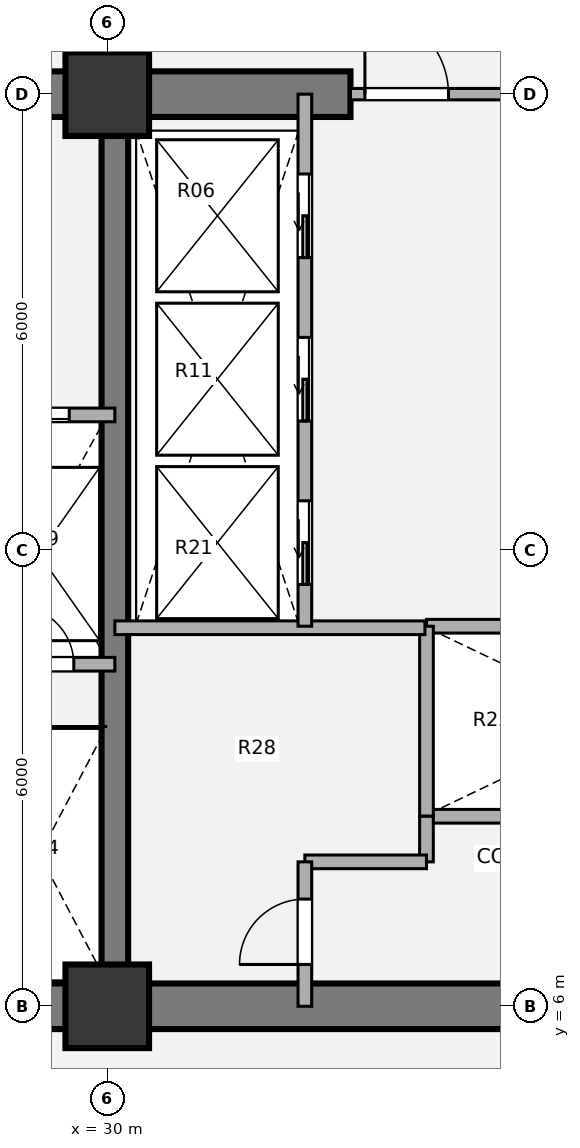
"""IFC4 building model, lengths in metres.
Left out: names, types, materials, properties, quantities, classifications, styles, units other than length and angle.
Written with IfcOpenShell. Run it as: python <this file> out.ifc"""

import sys

from ifc_helpers import new_model, si_unit, direction, frame, frame_2d, origin, origin_2d, place, context, subcontext, project, spatial, rectangle, extrude, source, transform, mapped, element, fill, save


model = new_model("IFC4")
c1 = context("Model", 3, precision=1e-05, world=origin(), true_north=direction((0.0, 1.0)))
c2 = subcontext(c1, "Body", "Model", "MODEL_VIEW")
j1 = project(units=[si_unit("LENGTHUNIT", "METRE"), si_unit("PLANEANGLEUNIT", "RADIAN")], contexts=[c1])
p1 = place(None, origin())
s1 = spatial("IfcSite", under=j1, at=p1, CompositionType="ELEMENT")
p2 = place(p1, origin())
s2 = spatial("IfcBuilding", under=s1, at=p2, CompositionType="ELEMENT")
p3 = place(p2, frame((0.0, 0.0, 49.68)))
s3 = spatial("IfcBuildingStorey", under=s2, at=p3, CompositionType="ELEMENT", Elevation=49.68)
m1 = source(origin(), c2, "Body", "SweptSolid", [
    extrude(rectangle(XDim=1.1, YDim=1.1, at=origin_2d()), origin(), (0.0, 0.0, 1.0), 3.78),
])
for number, where, z_axis, x_axis in (
    (1, (30.0, 6.0, 0.0), (0.0, 0.0, 1.0), (1.0, 0.0, 0.0)),
    (2, (30.0, 18.0, 0.0), (0.0, 0.0, 1.0), (1.0, 0.0, 0.0)),
):
    element("IfcColumn", number, at=place(p3, frame(where, z_axis=z_axis, x_axis=x_axis)), inside=s3, PredefinedType="COLUMN", context=c2, shape_type="MappedRepresentation", body=[
        mapped(m1, transform((0.0, 0.0, 0.0), x_axis=(1.0, 0.0, 0.0), y_axis=(0.0, 1.0, 0.0), z_axis=(0.0, 0.0, 1.0), scale=1.0)),
    ])
p4 = place(p3, frame((48.3, 6.0, 0.0), z_axis=(0.0, 0.0, 1.0), x_axis=(-1.0, 0.0, 0.0)))
e3 = element("IfcWall", 3, at=p4, inside=s3, PredefinedType="SHEAR", context=c2, shape_type="SweptSolid", body=[
    extrude(rectangle(XDim=24.6, YDim=0.6, at=frame_2d((12.3, 0.0))), origin(), (0.0, 0.0, 1.0), 3.78),
])
p5 = place(p3, frame((23.7, 18.0, 0.0), z_axis=(0.0, 0.0, 1.0), x_axis=(1.0, 0.0, 0.0)))
e4 = element("IfcWall", 4, at=p5, inside=s3, PredefinedType="SHEAR", context=c2, shape_type="SweptSolid", body=[
    extrude(rectangle(XDim=9.5, YDim=0.6, at=frame_2d((4.75, 0.0))), origin(), (0.0, 0.0, 1.0), 3.78),
])
p6 = place(p5, frame((2.95, 0.0, 0.0)))
e5 = element("IfcOpeningElement", 5, at=p6, cuts=e4, PredefinedType="OPENING", context=c2, shape_type="SweptSolid", body=[
    extrude(rectangle(XDim=1.1, YDim=2.1, at=origin_2d()), frame((0.55, 0.31, 1.05), z_axis=(0.0, -1.0, 0.0), x_axis=(1.0, 0.0, 0.0)), (0.0, 0.0, 1.0), 0.62),
])
p7 = place(p3, frame((30.1, 6.0, 0.0), z_axis=(0.0, 0.0, 1.0), x_axis=(0.0, 1.0, 0.0)))
e6 = element("IfcWall", 6, at=p7, inside=s3, PredefinedType="SHEAR", context=c2, shape_type="SweptSolid", body=[
    extrude(rectangle(XDim=12.0, YDim=0.35, at=frame_2d((6.0, 0.0))), origin(), (0.0, 0.0, 1.0), 3.78),
])
for number, where, z_axis, x_axis in (
    (7, (34.2, 11.0, 0.0), (0.0, 0.0, 1.0), (1.0, 0.0, 0.0)),
    (8, (34.2, 8.5, 0.0), (0.0, 0.0, 1.0), (1.0, 0.0, 0.0)),
):
    element("IfcWall", number, at=place(p3, frame(where, z_axis=z_axis, x_axis=x_axis)), inside=s3, PredefinedType="PARTITIONING", context=c2, shape_type="SweptSolid", body=[
        extrude(rectangle(XDim=5.15, YDim=0.18, at=frame_2d((2.575, 0.0))), origin(), (0.0, 0.0, 1.0), 3.5),
    ])
p8 = place(p3, frame((34.2, 8.5, 0.0), z_axis=(0.0, 0.0, 1.0), x_axis=(0.0, 1.0, 0.0)))
e9 = element("IfcWall", 9, at=p8, inside=s3, PredefinedType="PARTITIONING", context=c2, shape_type="SweptSolid", body=[
    extrude(rectangle(XDim=2.5, YDim=0.18, at=frame_2d((1.25, 0.0))), origin(), (0.0, 0.0, 1.0), 3.5),
])
p9 = place(p3, frame((30.1, 10.98, 0.0), z_axis=(0.0, 0.0, 1.0), x_axis=(1.0, 0.0, 0.0)))
e10 = element("IfcWall", 10, at=p9, inside=s3, PredefinedType="PARTITIONING", context=c2, shape_type="SweptSolid", body=[
    extrude(rectangle(XDim=4.08, YDim=0.18, at=frame_2d((2.04, 0.0))), origin(), (0.0, 0.0, 1.0), 3.5),
])
p10 = place(p3, frame((34.2, 7.9, 0.0), z_axis=(0.0, 0.0, 1.0), x_axis=(0.0, 1.0, 0.0)))
e11 = element("IfcWall", 11, at=p10, inside=s3, PredefinedType="PARTITIONING", context=c2, shape_type="SweptSolid", body=[
    extrude(rectangle(XDim=0.6, YDim=0.18, at=frame_2d((0.3, 0.0))), origin(), (0.0, 0.0, 1.0), 3.5),
])
p11 = place(p3, frame((32.6, 7.9, 0.0), z_axis=(0.0, 0.0, 1.0), x_axis=(1.0, 0.0, 0.0)))
e12 = element("IfcWall", 12, at=p11, inside=s3, PredefinedType="PARTITIONING", context=c2, shape_type="SweptSolid", body=[
    extrude(rectangle(XDim=1.6, YDim=0.18, at=frame_2d((0.8, 0.0))), origin(), (0.0, 0.0, 1.0), 3.5),
])
p12 = place(p3, frame((32.6, 6.0, 0.0), z_axis=(0.0, 0.0, 1.0), x_axis=(0.0, 1.0, 0.0)))
e13 = element("IfcWall", 13, at=p12, inside=s3, PredefinedType="PARTITIONING", context=c2, shape_type="SweptSolid", body=[
    extrude(rectangle(XDim=1.9, YDim=0.18, at=frame_2d((0.95, 0.0))), origin(), (0.0, 0.0, 1.0), 3.5),
])
p13 = place(p12, frame((0.55, 0.0, 0.0)))
e14 = element("IfcOpeningElement", 14, at=p13, cuts=e13, PredefinedType="OPENING", context=c2, shape_type="SweptSolid", body=[
    extrude(rectangle(XDim=0.86, YDim=2.1, at=origin_2d()), frame((0.43, 0.1, 1.05), z_axis=(0.0, -1.0, 0.0), x_axis=(1.0, 0.0, 0.0)), (0.0, 0.0, 1.0), 0.2),
])
p14 = place(p3, frame((33.2, 18.0, 0.0), z_axis=(0.0, 0.0, 1.0), x_axis=(1.0, 0.0, 0.0)))
e15 = element("IfcWall", 15, at=p14, inside=s3, PredefinedType="PARTITIONING", context=c2, shape_type="SweptSolid", body=[
    extrude(rectangle(XDim=5.6, YDim=0.15, at=frame_2d((2.8, 0.0))), origin(), (0.0, 0.0, 1.0), 2.315),
])
p15 = place(p14, frame((0.19, 0.0, 0.0)))
e16 = element("IfcOpeningElement", 16, at=p15, cuts=e15, PredefinedType="OPENING", context=c2, shape_type="SweptSolid", body=[
    extrude(rectangle(XDim=1.1, YDim=2.1, at=origin_2d()), frame((0.55, 0.085, 1.05), z_axis=(0.0, -1.0, 0.0), x_axis=(1.0, 0.0, 0.0)), (0.0, 0.0, 1.0), 0.17),
])
p16 = place(p14, frame((4.31, 0.0, 0.0)))
e17 = element("IfcOpeningElement", 17, at=p16, cuts=e15, PredefinedType="OPENING", context=c2, shape_type="SweptSolid", body=[
    extrude(rectangle(XDim=1.1, YDim=2.1, at=origin_2d()), frame((0.55, 0.085, 1.05), z_axis=(0.0, -1.0, 0.0), x_axis=(1.0, 0.0, 0.0)), (0.0, 0.0, 1.0), 0.17),
])
p17 = place(p3, frame((24.0, 13.78, 0.0), z_axis=(0.0, 0.0, 1.0), x_axis=(1.0, 0.0, 0.0)))
e18 = element("IfcWall", 18, at=p17, inside=s3, PredefinedType="PARTITIONING", context=c2, shape_type="SweptSolid", body=[
    extrude(rectangle(XDim=6.1, YDim=0.18, at=frame_2d((3.05, 0.0))), origin(), (0.0, 0.0, 1.0), 3.5),
])
p18 = place(p17, frame((1.15, 0.0, 0.0)))
e19 = element("IfcOpeningElement", 19, at=p18, cuts=e18, PredefinedType="OPENING", context=c2, shape_type="SweptSolid", body=[
    extrude(rectangle(XDim=1.1, YDim=2.1, at=origin_2d()), frame((0.55, 0.1, 1.05), z_axis=(0.0, -1.0, 0.0), x_axis=(1.0, 0.0, 0.0)), (0.0, 0.0, 1.0), 0.2),
])
p19 = place(p17, frame((4.4, 0.0, 0.0)))
e20 = element("IfcOpeningElement", 20, at=p19, cuts=e18, PredefinedType="OPENING", context=c2, shape_type="SweptSolid", body=[
    extrude(rectangle(XDim=1.1, YDim=2.1, at=origin_2d()), frame((0.55, 0.1, 1.05), z_axis=(0.0, -1.0, 0.0), x_axis=(1.0, 0.0, 0.0)), (0.0, 0.0, 1.0), 0.2),
])
p20 = place(p3, frame((28.15, 10.5, 0.0), z_axis=(0.0, 0.0, 1.0), x_axis=(1.0, 0.0, 0.0)))
e21 = element("IfcWall", 21, at=p20, inside=s3, PredefinedType="PARTITIONING", context=c2, shape_type="SweptSolid", body=[
    extrude(rectangle(XDim=1.95, YDim=0.18, at=frame_2d((0.975, 0.0))), origin(), (0.0, 0.0, 1.0), 3.5),
])
p21 = place(p20, frame((0.65, 0.0, 0.0)))
e22 = element("IfcOpeningElement", 22, at=p21, cuts=e21, PredefinedType="OPENING", context=c2, shape_type="SweptSolid", body=[
    extrude(rectangle(XDim=0.76, YDim=2.05, at=origin_2d()), frame((0.38, 0.1, 1.025), z_axis=(0.0, -1.0, 0.0), x_axis=(1.0, 0.0, 0.0)), (0.0, 0.0, 1.0), 0.2),
])
p22 = place(p3, frame((32.6, 11.0, 0.0), z_axis=(0.0, 0.0, 1.0), x_axis=(0.0, 1.0, 0.0)))
e23 = element("IfcWall", 23, at=p22, inside=s3, PredefinedType="PARTITIONING", context=c2, shape_type="SweptSolid", body=[
    extrude(rectangle(XDim=7.0, YDim=0.18, at=frame_2d((3.5, 0.0))), origin(), (0.0, 0.0, 1.0), 3.5),
])
p23 = place(p22, frame((0.55, 0.0, 0.0)))
e24 = element("IfcOpeningElement", 24, at=p23, cuts=e23, PredefinedType="OPENING", context=c2, shape_type="SweptSolid", body=[
    extrude(rectangle(XDim=1.1, YDim=2.1, at=origin_2d()), frame((0.55, 0.1, 1.05), z_axis=(0.0, -1.0, 0.0), x_axis=(1.0, 0.0, 0.0)), (0.0, 0.0, 1.0), 0.2),
])
p24 = place(p22, frame((2.7, 0.0, 0.0)))
e25 = element("IfcOpeningElement", 25, at=p24, cuts=e23, PredefinedType="OPENING", context=c2, shape_type="SweptSolid", body=[
    extrude(rectangle(XDim=1.1, YDim=2.1, at=origin_2d()), frame((0.55, 0.1, 1.05), z_axis=(0.0, -1.0, 0.0), x_axis=(1.0, 0.0, 0.0)), (0.0, 0.0, 1.0), 0.2),
])
p25 = place(p22, frame((4.85, 0.0, 0.0)))
e26 = element("IfcOpeningElement", 26, at=p25, cuts=e23, PredefinedType="OPENING", context=c2, shape_type="SweptSolid", body=[
    extrude(rectangle(XDim=1.1, YDim=2.1, at=origin_2d()), frame((0.55, 0.1, 1.05), z_axis=(0.0, -1.0, 0.0), x_axis=(1.0, 0.0, 0.0)), (0.0, 0.0, 1.0), 0.2),
])
m2 = source(origin(), c2, "Body", "SweptSolid", [
    extrude(rectangle(XDim=0.86, YDim=2.1, at=origin_2d()), frame((0.43, 0.025, 1.05), z_axis=(0.0, -1.0, 0.0), x_axis=(1.0, 0.0, 0.0)), (0.0, 0.0, 1.0), 0.05),
])
p26 = place(p13, origin())
e27 = element("IfcDoor", 27, at=p26, inside=s3, OperationType="SINGLE_SWING_LEFT", PredefinedType="DOOR", context=c2, shape_type="MappedRepresentation", body=[
    mapped(m2, transform((0.0, 0.0, 0.0), x_axis=(1.0, 0.0, 0.0), y_axis=(0.0, 1.0, 0.0), z_axis=(0.0, 0.0, 1.0), scale=1.0)),
])
fill(e14, e27)
m3 = source(origin(), c2, "Body", "SweptSolid", [
    extrude(rectangle(XDim=1.1, YDim=2.1, at=origin_2d()), frame((0.55, 0.025, 1.05), z_axis=(0.0, -1.0, 0.0), x_axis=(1.0, 0.0, 0.0)), (0.0, 0.0, 1.0), 0.05),
])
p27 = place(p15, origin())
e28 = element("IfcDoor", 28, at=p27, inside=s3, OperationType="SINGLE_SWING_LEFT", PredefinedType="DOOR", context=c2, shape_type="MappedRepresentation", body=[
    mapped(m3, transform((0.0, 0.0, 0.0), x_axis=(1.0, 0.0, 0.0), y_axis=(0.0, 1.0, 0.0), z_axis=(0.0, 0.0, 1.0), scale=1.0)),
])
fill(e16, e28)
m4 = source(origin(), c2, "Body", "SweptSolid", [
    extrude(rectangle(XDim=1.1, YDim=2.1, at=origin_2d()), frame((0.55, 0.025, 1.05), z_axis=(0.0, -1.0, 0.0), x_axis=(1.0, 0.0, 0.0)), (0.0, 0.0, 1.0), 0.05),
])
p28 = place(p19, origin())
e29 = element("IfcDoor", 29, at=p28, inside=s3, OperationType="SLIDING_TO_LEFT", PredefinedType="DOOR", context=c2, shape_type="MappedRepresentation", body=[
    mapped(m4, transform((0.0, 0.0, 0.0), x_axis=(1.0, 0.0, 0.0), y_axis=(0.0, 1.0, 0.0), z_axis=(0.0, 0.0, 1.0), scale=1.0)),
])
fill(e20, e29)
m5 = source(origin(), c2, "Body", "SweptSolid", [
    extrude(rectangle(XDim=0.76, YDim=2.05, at=origin_2d()), frame((0.38, 0.025, 1.025), z_axis=(0.0, -1.0, 0.0), x_axis=(1.0, 0.0, 0.0)), (0.0, 0.0, 1.0), 0.05),
])
p29 = place(p21, origin())
e30 = element("IfcDoor", 30, at=p29, inside=s3, OperationType="SINGLE_SWING_LEFT", PredefinedType="DOOR", context=c2, shape_type="MappedRepresentation", body=[
    mapped(m5, transform((0.0, 0.0, 0.0), x_axis=(1.0, 0.0, 0.0), y_axis=(0.0, 1.0, 0.0), z_axis=(0.0, 0.0, 1.0), scale=1.0)),
])
fill(e22, e30)
p30 = place(p23, origin())
e31 = element("IfcDoor", 31, at=p30, inside=s3, OperationType="SLIDING_TO_LEFT", PredefinedType="DOOR", context=c2, shape_type="MappedRepresentation", body=[
    mapped(m4, transform((0.0, 0.0, 0.0), x_axis=(1.0, 0.0, 0.0), y_axis=(0.0, 1.0, 0.0), z_axis=(0.0, 0.0, 1.0), scale=1.0)),
])
fill(e24, e31)
p31 = place(p24, origin())
e32 = element("IfcDoor", 32, at=p31, inside=s3, OperationType="SLIDING_TO_LEFT", PredefinedType="DOOR", context=c2, shape_type="MappedRepresentation", body=[
    mapped(m4, transform((0.0, 0.0, 0.0), x_axis=(1.0, 0.0, 0.0), y_axis=(0.0, 1.0, 0.0), z_axis=(0.0, 0.0, 1.0), scale=1.0)),
])
fill(e25, e32)
p32 = place(p25, origin())
e33 = element("IfcDoor", 33, at=p32, inside=s3, OperationType="SLIDING_TO_LEFT", PredefinedType="DOOR", context=c2, shape_type="MappedRepresentation", body=[
    mapped(m4, transform((0.0, 0.0, 0.0), x_axis=(1.0, 0.0, 0.0), y_axis=(0.0, 1.0, 0.0), z_axis=(0.0, 0.0, 1.0), scale=1.0)),
])
fill(e26, e33)
save(model, sys.argv[1])
